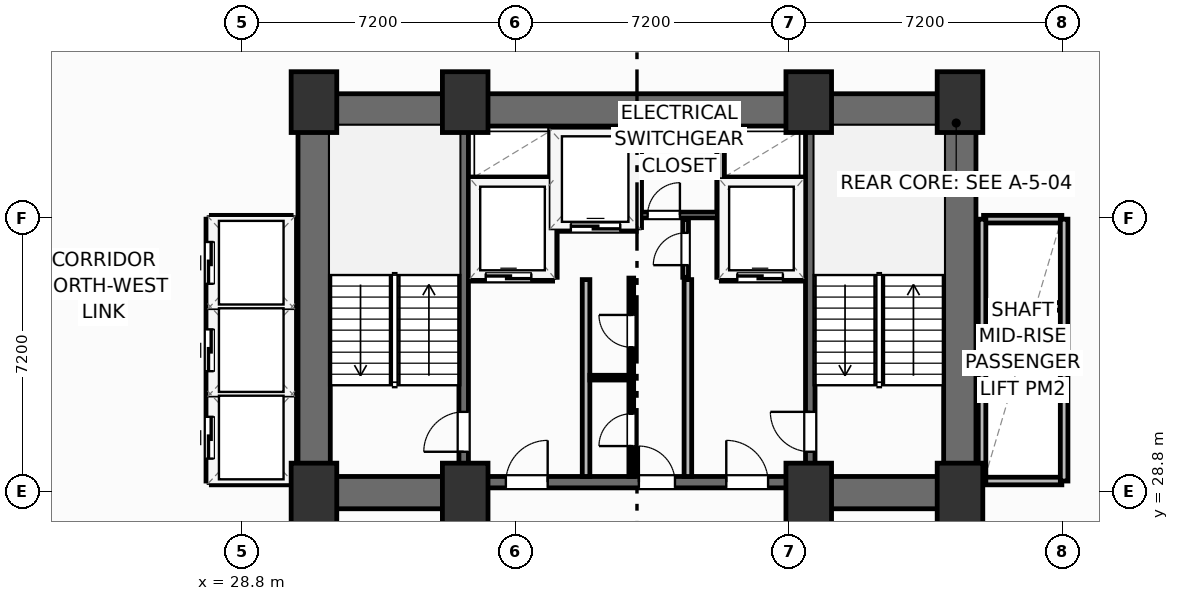
"""IFC4 building model, lengths in metres.
Left out: names, types, materials, properties, quantities, classifications, styles, units other than length and angle.
Written with IfcOpenShell. Run it as: python <this file> out.ifc"""

import sys

from ifc_helpers import new_model, si_unit, direction, frame, frame_2d, origin, origin_2d, place, context, subcontext, project, spatial, rectangle, extrude, element, fill, save


model = new_model("IFC4")
c1 = context("Model", 3, precision=1e-05, world=origin(), true_north=direction((0.0, 1.0)))
c2 = subcontext(c1, "Body", "Model", "MODEL_VIEW")
j1 = project(units=[si_unit("LENGTHUNIT", "METRE"), si_unit("PLANEANGLEUNIT", "RADIAN")], contexts=[c1])
p1 = place(None, origin())
s1 = spatial("IfcSite", under=j1, at=p1, CompositionType="ELEMENT")
p2 = place(p1, origin())
s2 = spatial("IfcBuilding", under=s1, at=p2, CompositionType="ELEMENT")
p3 = place(p2, frame((0.0, 0.0, 30.7)))
s3 = spatial("IfcBuildingStorey", under=s2, at=p3, CompositionType="ELEMENT", Elevation=30.7)
for number, where, z_axis, x_axis in (
    (1, (30.7, 28.75, 0.0), (0.0, 0.0, 1.0), (1.0, 0.0, 0.0)),
    (2, (34.68, 28.75, 0.0), (0.0, 0.0, 1.0), (1.0, 0.0, 0.0)),
    (3, (43.72, 28.75, 0.0), (0.0, 0.0, 1.0), (1.0, 0.0, 0.0)),
    (4, (47.7, 28.75, 0.0), (0.0, 0.0, 1.0), (1.0, 0.0, 0.0)),
    (5, (30.7, 39.05, 0.0), (0.0, 0.0, 1.0), (1.0, 0.0, 0.0)),
    (6, (34.68, 39.05, 0.0), (0.0, 0.0, 1.0), (1.0, 0.0, 0.0)),
    (7, (43.72, 39.05, 0.0), (0.0, 0.0, 1.0), (1.0, 0.0, 0.0)),
    (8, (47.7, 39.05, 0.0), (0.0, 0.0, 1.0), (1.0, 0.0, 0.0)),
):
    element("IfcColumn", number, at=place(p3, frame(where, z_axis=z_axis, x_axis=x_axis)), inside=s3, PredefinedType="COLUMN", context=c2, shape_type="SweptSolid", body=[
        extrude(rectangle(XDim=1.2, YDim=1.6, at=origin_2d()), origin(), (0.0, 0.0, 1.0), 3.7),
    ])
p4 = place(p3, frame((30.28, 38.845, 0.0), z_axis=(0.0, 0.0, 1.0), x_axis=(1.0, 0.0, 0.0)))
e9 = element("IfcWall", 9, at=p4, inside=s3, PredefinedType="SHEAR", context=c2, shape_type="SweptSolid", body=[
    extrude(rectangle(XDim=17.84, YDim=0.85, at=frame_2d((8.92, 0.0))), origin(), (0.0, 0.0, 1.0), 3.45),
])
for number, where, z_axis, x_axis in (
    (10, (30.705, 29.2, 0.0), (0.0, 0.0, 1.0), (0.0, 1.0, 0.0)),
    (11, (47.695, 29.2, 0.0), (0.0, 0.0, 1.0), (0.0, 1.0, 0.0)),
):
    element("IfcWall", number, at=place(p3, frame(where, z_axis=z_axis, x_axis=x_axis)), inside=s3, PredefinedType="SHEAR", context=c2, shape_type="SweptSolid", body=[
        extrude(rectangle(XDim=9.22, YDim=0.85, at=frame_2d((4.61, 0.0))), origin(), (0.0, 0.0, 1.0), 3.45),
    ])
for number, where, z_axis, x_axis in (
    (12, (30.28, 28.775, 0.0), (0.0, 0.0, 1.0), (1.0, 0.0, 0.0)),
    (13, (43.6, 28.775, 0.0), (0.0, 0.0, 1.0), (1.0, 0.0, 0.0)),
):
    element("IfcWall", number, at=place(p3, frame(where, z_axis=z_axis, x_axis=x_axis)), inside=s3, PredefinedType="SHEAR", context=c2, shape_type="SweptSolid", body=[
        extrude(rectangle(XDim=4.52, YDim=0.85, at=frame_2d((2.26, 0.0))), origin(), (0.0, 0.0, 1.0), 3.45),
    ])
p5 = place(p3, frame((34.8, 29.05, 0.0), z_axis=(0.0, 0.0, 1.0), x_axis=(1.0, 0.0, 0.0)))
e14 = element("IfcWall", 14, at=p5, inside=s3, PredefinedType="SHEAR", context=c2, shape_type="SweptSolid", body=[
    extrude(rectangle(XDim=8.8, YDim=0.3, at=frame_2d((4.4, 0.0))), origin(), (0.0, 0.0, 1.0), 3.45),
])
p6 = place(p5, frame((0.95, 0.0, 0.0)))
e15 = element("IfcOpeningElement", 15, at=p6, cuts=e14, PredefinedType="OPENING", context=c2, shape_type="SweptSolid", body=[
    extrude(rectangle(XDim=1.1, YDim=2.15, at=frame_2d((0.55, 1.075))), frame((0.0, 0.16, 0.0), z_axis=(0.0, -1.0, 0.0), x_axis=(1.0, 0.0, 0.0)), (0.0, 0.0, 1.0), 0.32),
])
p7 = place(p5, frame((6.75, 0.0, 0.0)))
e16 = element("IfcOpeningElement", 16, at=p7, cuts=e14, PredefinedType="OPENING", context=c2, shape_type="SweptSolid", body=[
    extrude(rectangle(XDim=1.1, YDim=2.15, at=frame_2d((0.55, 1.075))), frame((0.0, 0.16, 0.0), z_axis=(0.0, -1.0, 0.0), x_axis=(1.0, 0.0, 0.0)), (0.0, 0.0, 1.0), 0.32),
])
p8 = place(p5, frame((4.45, 0.0, 0.0)))
e17 = element("IfcOpeningElement", 17, at=p8, cuts=e14, PredefinedType="OPENING", context=c2, shape_type="SweptSolid", body=[
    extrude(rectangle(XDim=0.95, YDim=2.15, at=frame_2d((0.475, 1.075))), frame((0.0, 0.16, 0.0), z_axis=(0.0, -1.0, 0.0), x_axis=(1.0, 0.0, 0.0)), (0.0, 0.0, 1.0), 0.32),
])
p9 = place(p3, frame((34.64, 29.2, 0.0), z_axis=(0.0, 0.0, 1.0), x_axis=(0.0, 1.0, 0.0)))
e18 = element("IfcWall", 18, at=p9, inside=s3, PredefinedType="SHEAR", context=c2, shape_type="SweptSolid", body=[
    extrude(rectangle(XDim=9.22, YDim=0.25, at=frame_2d((4.61, 0.0))), origin(), (0.0, 0.0, 1.0), 3.45),
])
p10 = place(p9, frame((0.65, 0.0, 0.0)))
e19 = element("IfcOpeningElement", 19, at=p10, cuts=e18, PredefinedType="OPENING", context=c2, shape_type="SweptSolid", body=[
    extrude(rectangle(XDim=1.05, YDim=2.15, at=frame_2d((0.525, 1.075))), frame((0.0, 0.135, 0.0), z_axis=(0.0, -1.0, 0.0), x_axis=(1.0, 0.0, 0.0)), (0.0, 0.0, 1.0), 0.27),
])
p11 = place(p3, frame((43.76, 29.2, 0.0), z_axis=(0.0, 0.0, 1.0), x_axis=(0.0, 1.0, 0.0)))
e20 = element("IfcWall", 20, at=p11, inside=s3, PredefinedType="SHEAR", context=c2, shape_type="SweptSolid", body=[
    extrude(rectangle(XDim=9.22, YDim=0.25, at=frame_2d((4.61, 0.0))), origin(), (0.0, 0.0, 1.0), 3.45),
])
p12 = place(p11, frame((0.65, 0.0, 0.0)))
e21 = element("IfcOpeningElement", 21, at=p12, cuts=e20, PredefinedType="OPENING", context=c2, shape_type="SweptSolid", body=[
    extrude(rectangle(XDim=1.05, YDim=2.15, at=frame_2d((0.525, 1.075))), frame((0.0, 0.135, 0.0), z_axis=(0.0, -1.0, 0.0), x_axis=(1.0, 0.0, 0.0)), (0.0, 0.0, 1.0), 0.27),
])
for number, where, z_axis, x_axis in (
    (22, (37.86, 29.2, 0.0), (0.0, 0.0, 1.0), (0.0, 1.0, 0.0)),
    (23, (40.54, 29.2, 0.0), (0.0, 0.0, 1.0), (0.0, 1.0, 0.0)),
):
    element("IfcWall", number, at=place(p3, frame(where, z_axis=z_axis, x_axis=x_axis)), inside=s3, PredefinedType="PARTITIONING", context=c2, shape_type="SweptSolid", body=[
        extrude(rectangle(XDim=5.18, YDim=0.2, at=frame_2d((2.59, 0.0))), origin(), (0.0, 0.0, 1.0), 3.45),
    ])
p13 = place(p3, frame((34.8, 34.44, 0.0), z_axis=(0.0, 0.0, 1.0), x_axis=(1.0, 0.0, 0.0)))
e24 = element("IfcWall", 24, at=p13, inside=s3, PredefinedType="PARTITIONING", context=c2, shape_type="SweptSolid", body=[
    extrude(rectangle(XDim=2.18, YDim=0.2, at=frame_2d((1.09, 0.0))), origin(), (0.0, 0.0, 1.0), 3.45),
])
p14 = place(p13, frame((0.42, 0.0, 0.0)))
e25 = element("IfcOpeningElement", 25, at=p14, cuts=e24, PredefinedType="OPENING", context=c2, shape_type="SweptSolid", body=[
    extrude(rectangle(XDim=1.2, YDim=2.2, at=frame_2d((0.6, 1.1))), frame((0.0, 0.11, 0.0), z_axis=(0.0, -1.0, 0.0), x_axis=(1.0, 0.0, 0.0)), (0.0, 0.0, 1.0), 0.22),
])
p15 = place(p3, frame((34.8, 36.98, 0.0), z_axis=(0.0, 0.0, 1.0), x_axis=(1.0, 0.0, 0.0)))
e26 = element("IfcWall", 26, at=p15, inside=s3, PredefinedType="PARTITIONING", context=c2, shape_type="SweptSolid", body=[
    extrude(rectangle(XDim=2.18, YDim=0.2, at=frame_2d((1.09, 0.0))), origin(), (0.0, 0.0, 1.0), 3.45),
])
p16 = place(p3, frame((37.0, 34.44, 0.0), z_axis=(0.0, 0.0, 1.0), x_axis=(0.0, 1.0, 0.0)))
e27 = element("IfcWall", 27, at=p16, inside=s3, PredefinedType="PARTITIONING", context=c2, shape_type="SweptSolid", body=[
    extrude(rectangle(XDim=3.9, YDim=0.2, at=frame_2d((1.95, 0.0))), origin(), (0.0, 0.0, 1.0), 3.45),
])
p17 = place(p3, frame((41.42, 34.44, 0.0), z_axis=(0.0, 0.0, 1.0), x_axis=(1.0, 0.0, 0.0)))
e28 = element("IfcWall", 28, at=p17, inside=s3, PredefinedType="PARTITIONING", context=c2, shape_type="SweptSolid", body=[
    extrude(rectangle(XDim=2.18, YDim=0.2, at=frame_2d((1.09, 0.0))), origin(), (0.0, 0.0, 1.0), 3.45),
])
p18 = place(p17, frame((0.42, 0.0, 0.0)))
e29 = element("IfcOpeningElement", 29, at=p18, cuts=e28, PredefinedType="OPENING", context=c2, shape_type="SweptSolid", body=[
    extrude(rectangle(XDim=1.2, YDim=2.2, at=frame_2d((0.6, 1.1))), frame((0.0, 0.11, 0.0), z_axis=(0.0, -1.0, 0.0), x_axis=(1.0, 0.0, 0.0)), (0.0, 0.0, 1.0), 0.22),
])
p19 = place(p3, frame((41.42, 36.98, 0.0), z_axis=(0.0, 0.0, 1.0), x_axis=(1.0, 0.0, 0.0)))
e30 = element("IfcWall", 30, at=p19, inside=s3, PredefinedType="PARTITIONING", context=c2, shape_type="SweptSolid", body=[
    extrude(rectangle(XDim=2.18, YDim=0.2, at=frame_2d((1.09, 0.0))), origin(), (0.0, 0.0, 1.0), 3.45),
])
p20 = place(p3, frame((41.4, 34.44, 0.0), z_axis=(0.0, 0.0, 1.0), x_axis=(0.0, 1.0, 0.0)))
e31 = element("IfcWall", 31, at=p20, inside=s3, PredefinedType="PARTITIONING", context=c2, shape_type="SweptSolid", body=[
    extrude(rectangle(XDim=3.9, YDim=0.2, at=frame_2d((1.95, 0.0))), origin(), (0.0, 0.0, 1.0), 3.45),
])
p21 = place(p3, frame((37.06, 35.75, 0.0), z_axis=(0.0, 0.0, 1.0), x_axis=(1.0, 0.0, 0.0)))
e32 = element("IfcWall", 32, at=p21, inside=s3, PredefinedType="PARTITIONING", context=c2, shape_type="SweptSolid", body=[
    extrude(rectangle(XDim=2.12, YDim=0.2, at=frame_2d((1.06, 0.0))), origin(), (0.0, 0.0, 1.0), 3.45),
])
p22 = place(p21, frame((0.4, 0.0, 0.0)))
e33 = element("IfcOpeningElement", 33, at=p22, cuts=e32, PredefinedType="OPENING", context=c2, shape_type="SweptSolid", body=[
    extrude(rectangle(XDim=1.3, YDim=2.2, at=frame_2d((0.65, 1.1))), frame((0.0, 0.11, 0.0), z_axis=(0.0, -1.0, 0.0), x_axis=(1.0, 0.0, 0.0)), (0.0, 0.0, 1.0), 0.22),
])
p23 = place(p3, frame((39.22, 35.75, 0.0), z_axis=(0.0, 0.0, 1.0), x_axis=(0.0, 1.0, 0.0)))
e34 = element("IfcWall", 34, at=p23, inside=s3, PredefinedType="PARTITIONING", context=c2, shape_type="SweptSolid", body=[
    extrude(rectangle(XDim=2.59, YDim=0.2, at=frame_2d((1.295, 0.0))), origin(), (0.0, 0.0, 1.0), 3.45),
])
p24 = place(p3, frame((39.3, 36.08, 0.0), z_axis=(0.0, 0.0, 1.0), x_axis=(1.0, 0.0, 0.0)))
e35 = element("IfcWall", 35, at=p24, inside=s3, PredefinedType="PARTITIONING", context=c2, shape_type="SweptSolid", body=[
    extrude(rectangle(XDim=2.02, YDim=0.15, at=frame_2d((1.01, 0.0))), origin(), (0.0, 0.0, 1.0), 3.45),
])
p25 = place(p24, frame((0.18, 0.0, 0.0)))
e36 = element("IfcOpeningElement", 36, at=p25, cuts=e35, PredefinedType="OPENING", context=c2, shape_type="SweptSolid", body=[
    extrude(rectangle(XDim=0.85, YDim=2.05, at=frame_2d((0.425, 1.025))), frame((0.0, 0.085, 0.0), z_axis=(0.0, -1.0, 0.0), x_axis=(1.0, 0.0, 0.0)), (0.0, 0.0, 1.0), 0.17),
])
p26 = place(p3, frame((40.48, 34.44, 0.0), z_axis=(0.0, 0.0, 1.0), x_axis=(0.0, 1.0, 0.0)))
e37 = element("IfcWall", 37, at=p26, inside=s3, PredefinedType="PARTITIONING", context=c2, shape_type="SweptSolid", body=[
    extrude(rectangle(XDim=1.52, YDim=0.15, at=frame_2d((0.76, 0.0))), origin(), (0.0, 0.0, 1.0), 3.45),
])
p27 = place(p26, frame((0.32, 0.0, 0.0)))
e38 = element("IfcOpeningElement", 38, at=p27, cuts=e37, PredefinedType="OPENING", context=c2, shape_type="SweptSolid", body=[
    extrude(rectangle(XDim=0.85, YDim=2.05, at=frame_2d((0.425, 1.025))), frame((0.0, 0.085, 0.0), z_axis=(0.0, -1.0, 0.0), x_axis=(1.0, 0.0, 0.0)), (0.0, 0.0, 1.0), 0.17),
])
p28 = place(p3, frame((37.96, 31.8, 0.0), z_axis=(0.0, 0.0, 1.0), x_axis=(1.0, 0.0, 0.0)))
e39 = element("IfcWall", 39, at=p28, inside=s3, PredefinedType="PARTITIONING", context=c2, shape_type="SweptSolid", body=[
    extrude(rectangle(XDim=1.09, YDim=0.125, at=frame_2d((0.545, 0.0))), origin(), (0.0, 0.0, 1.0), 3.45),
])
p29 = place(p3, frame((39.05, 29.2, 0.0), z_axis=(0.0, 0.0, 1.0), x_axis=(0.0, 1.0, 0.0)))
e40 = element("IfcWall", 40, at=p29, inside=s3, PredefinedType="PARTITIONING", context=c2, shape_type="SweptSolid", body=[
    extrude(rectangle(XDim=5.22, YDim=0.125, at=frame_2d((2.61, 0.0))), origin(), (0.0, 0.0, 1.0), 3.45),
])
p30 = place(p29, frame((0.8, 0.0, 0.0)))
e41 = element("IfcOpeningElement", 41, at=p30, cuts=e40, PredefinedType="OPENING", context=c2, shape_type="SweptSolid", body=[
    extrude(rectangle(XDim=0.85, YDim=2.05, at=frame_2d((0.425, 1.025))), frame((0.0, 0.073, 0.0), z_axis=(0.0, -1.0, 0.0), x_axis=(1.0, 0.0, 0.0)), (0.0, 0.0, 1.0), 0.145),
])
p31 = place(p29, frame((3.4, 0.0, 0.0)))
e42 = element("IfcOpeningElement", 42, at=p31, cuts=e40, PredefinedType="OPENING", context=c2, shape_type="SweptSolid", body=[
    extrude(rectangle(XDim=0.85, YDim=2.05, at=frame_2d((0.425, 1.025))), frame((0.0, 0.073, 0.0), z_axis=(0.0, -1.0, 0.0), x_axis=(1.0, 0.0, 0.0)), (0.0, 0.0, 1.0), 0.145),
])
for number, where, z_axis, x_axis in (
    (43, (28.02, 31.375, 0.0), (0.0, 0.0, 1.0), (1.0, 0.0, 0.0)),
    (44, (28.02, 33.675, 0.0), (0.0, 0.0, 1.0), (1.0, 0.0, 0.0)),
):
    element("IfcWall", number, at=place(p3, frame(where, z_axis=z_axis, x_axis=x_axis)), inside=s3, PredefinedType="PARTITIONING", context=c2, shape_type="SweptSolid", body=[
        extrude(rectangle(XDim=2.06, YDim=0.2, at=frame_2d((1.03, 0.0))), origin(), (0.0, 0.0, 1.0), 3.45),
    ])
for number, where, z_axis, x_axis in (
    (45, (28.0, 29.08, 0.0), (0.0, 0.0, 1.0), (1.0, 0.0, 0.0)),
    (46, (28.0, 35.97, 0.0), (0.0, 0.0, 1.0), (1.0, 0.0, 0.0)),
):
    element("IfcWall", number, at=place(p3, frame(where, z_axis=z_axis, x_axis=x_axis)), inside=s3, PredefinedType="PARTITIONING", context=c2, shape_type="SweptSolid", body=[
        extrude(rectangle(XDim=2.1, YDim=0.2, at=frame_2d((1.05, 0.0))), origin(), (0.0, 0.0, 1.0), 3.45),
    ])
p32 = place(p3, frame((30.12, 29.08, 0.0), z_axis=(0.0, 0.0, 1.0), x_axis=(0.0, 1.0, 0.0)))
e47 = element("IfcWall", 47, at=p32, inside=s3, PredefinedType="PARTITIONING", context=c2, shape_type="SweptSolid", body=[
    extrude(rectangle(XDim=6.89, YDim=0.2, at=frame_2d((3.445, 0.0))), origin(), (0.0, 0.0, 1.0), 3.45),
])
p33 = place(p3, frame((27.96, 29.08, 0.0), z_axis=(0.0, 0.0, 1.0), x_axis=(0.0, 1.0, 0.0)))
e48 = element("IfcWall", 48, at=p33, inside=s3, PredefinedType="PARTITIONING", context=c2, shape_type="SweptSolid", body=[
    extrude(rectangle(XDim=6.89, YDim=0.2, at=frame_2d((3.445, 0.0))), origin(), (0.0, 0.0, 1.0), 3.45),
])
p34 = place(p33, frame((0.59, 0.0, 0.0)))
e49 = element("IfcOpeningElement", 49, at=p34, cuts=e48, PredefinedType="OPENING", context=c2, shape_type="SweptSolid", body=[
    extrude(rectangle(XDim=1.1, YDim=2.15, at=frame_2d((0.55, 1.075))), frame((0.0, 0.11, 0.0), z_axis=(0.0, -1.0, 0.0), x_axis=(1.0, 0.0, 0.0)), (0.0, 0.0, 1.0), 0.22),
])
p35 = place(p33, frame((2.89, 0.0, 0.0)))
e50 = element("IfcOpeningElement", 50, at=p35, cuts=e48, PredefinedType="OPENING", context=c2, shape_type="SweptSolid", body=[
    extrude(rectangle(XDim=1.1, YDim=2.15, at=frame_2d((0.55, 1.075))), frame((0.0, 0.11, 0.0), z_axis=(0.0, -1.0, 0.0), x_axis=(1.0, 0.0, 0.0)), (0.0, 0.0, 1.0), 0.22),
])
p36 = place(p33, frame((5.19, 0.0, 0.0)))
e51 = element("IfcOpeningElement", 51, at=p36, cuts=e48, PredefinedType="OPENING", context=c2, shape_type="SweptSolid", body=[
    extrude(rectangle(XDim=1.1, YDim=2.15, at=frame_2d((0.55, 1.075))), frame((0.0, 0.11, 0.0), z_axis=(0.0, -1.0, 0.0), x_axis=(1.0, 0.0, 0.0)), (0.0, 0.0, 1.0), 0.22),
])
for number, where, z_axis, x_axis in (
    (52, (48.32, 31.375, 0.0), (0.0, 0.0, 1.0), (1.0, 0.0, 0.0)),
    (53, (48.32, 33.675, 0.0), (0.0, 0.0, 1.0), (1.0, 0.0, 0.0)),
):
    element("IfcWall", number, at=place(p3, frame(where, z_axis=z_axis, x_axis=x_axis)), inside=s3, PredefinedType="PARTITIONING", context=c2, shape_type="SweptSolid", body=[
        extrude(rectangle(XDim=2.06, YDim=0.2, at=frame_2d((1.03, 0.0))), origin(), (0.0, 0.0, 1.0), 3.45),
    ])
p37 = place(p3, frame((48.32, 29.08, 0.0), z_axis=(0.0, 0.0, 1.0), x_axis=(1.0, 0.0, 0.0)))
e54 = element("IfcWall", 54, at=p37, inside=s3, PredefinedType="PARTITIONING", context=c2, shape_type="SweptSolid", body=[
    extrude(rectangle(XDim=2.06, YDim=0.2, at=frame_2d((1.03, 0.0))), origin(), (0.0, 0.0, 1.0), 2.662),
])
p38 = place(p3, frame((48.32, 35.97, 0.0), z_axis=(0.0, 0.0, 1.0), x_axis=(1.0, 0.0, 0.0)))
e55 = element("IfcWall", 55, at=p38, inside=s3, PredefinedType="PARTITIONING", context=c2, shape_type="SweptSolid", body=[
    extrude(rectangle(XDim=2.06, YDim=0.2, at=frame_2d((1.03, 0.0))), origin(), (0.0, 0.0, 1.0), 3.45),
])
for number, where, z_axis, x_axis in (
    (56, (48.28, 29.08, 0.0), (0.0, 0.0, 1.0), (0.0, 1.0, 0.0)),
    (57, (50.44, 29.08, 0.0), (0.0, 0.0, 1.0), (0.0, 1.0, 0.0)),
):
    element("IfcWall", number, at=place(p3, frame(where, z_axis=z_axis, x_axis=x_axis)), inside=s3, PredefinedType="PARTITIONING", context=c2, shape_type="SweptSolid", body=[
        extrude(rectangle(XDim=6.89, YDim=0.2, at=frame_2d((3.445, 0.0))), origin(), (0.0, 0.0, 1.0), 3.45),
    ])
p39 = place(p10, origin())
e58 = element("IfcDoor", 58, at=p39, inside=s3, OperationType="SINGLE_SWING_LEFT", PredefinedType="DOOR", context=c2, shape_type="SweptSolid", body=[
    extrude(rectangle(XDim=1.05, YDim=2.15, at=frame_2d((0.525, 1.075))), frame((0.0, 0.025, 0.0), z_axis=(0.0, -1.0, 0.0), x_axis=(1.0, 0.0, 0.0)), (0.0, 0.0, 1.0), 0.05),
])
fill(e19, e58)
p40 = place(p12, origin())
e59 = element("IfcDoor", 59, at=p40, inside=s3, OperationType="SINGLE_SWING_RIGHT", PredefinedType="DOOR", context=c2, shape_type="SweptSolid", body=[
    extrude(rectangle(XDim=1.05, YDim=2.15, at=frame_2d((0.525, 1.075))), frame((0.0, 0.025, 0.0), z_axis=(0.0, -1.0, 0.0), x_axis=(1.0, 0.0, 0.0)), (0.0, 0.0, 1.0), 0.05),
])
fill(e21, e59)
p41 = place(p6, origin())
e60 = element("IfcDoor", 60, at=p41, inside=s3, OperationType="SINGLE_SWING_RIGHT", PredefinedType="DOOR", context=c2, shape_type="SweptSolid", body=[
    extrude(rectangle(XDim=1.1, YDim=2.15, at=frame_2d((0.55, 1.075))), frame((0.0, 0.025, 0.0), z_axis=(0.0, -1.0, 0.0), x_axis=(1.0, 0.0, 0.0)), (0.0, 0.0, 1.0), 0.05),
])
fill(e15, e60)
p42 = place(p7, origin())
e61 = element("IfcDoor", 61, at=p42, inside=s3, OperationType="SINGLE_SWING_LEFT", PredefinedType="DOOR", context=c2, shape_type="SweptSolid", body=[
    extrude(rectangle(XDim=1.1, YDim=2.15, at=frame_2d((0.55, 1.075))), frame((0.0, 0.025, 0.0), z_axis=(0.0, -1.0, 0.0), x_axis=(1.0, 0.0, 0.0)), (0.0, 0.0, 1.0), 0.05),
])
fill(e16, e61)
p43 = place(p14, origin())
e62 = element("IfcDoor", 62, at=p43, inside=s3, OperationType="SLIDING_TO_LEFT", PredefinedType="DOOR", context=c2, shape_type="SweptSolid", body=[
    extrude(rectangle(XDim=1.2, YDim=2.2, at=frame_2d((0.6, 1.1))), frame((0.0, 0.025, 0.0), z_axis=(0.0, -1.0, 0.0), x_axis=(1.0, 0.0, 0.0)), (0.0, 0.0, 1.0), 0.05),
])
fill(e25, e62)
p44 = place(p18, origin())
e63 = element("IfcDoor", 63, at=p44, inside=s3, OperationType="SLIDING_TO_LEFT", PredefinedType="DOOR", context=c2, shape_type="SweptSolid", body=[
    extrude(rectangle(XDim=1.2, YDim=2.2, at=frame_2d((0.6, 1.1))), frame((0.0, 0.025, 0.0), z_axis=(0.0, -1.0, 0.0), x_axis=(1.0, 0.0, 0.0)), (0.0, 0.0, 1.0), 0.05),
])
fill(e29, e63)
p45 = place(p22, origin())
e64 = element("IfcDoor", 64, at=p45, inside=s3, OperationType="SLIDING_TO_LEFT", PredefinedType="DOOR", context=c2, shape_type="SweptSolid", body=[
    extrude(rectangle(XDim=1.3, YDim=2.2, at=frame_2d((0.65, 1.1))), frame((0.0, 0.025, 0.0), z_axis=(0.0, -1.0, 0.0), x_axis=(1.0, 0.0, 0.0)), (0.0, 0.0, 1.0), 0.05),
])
fill(e33, e64)
p46 = place(p25, origin())
e65 = element("IfcDoor", 65, at=p46, inside=s3, OperationType="SINGLE_SWING_RIGHT", PredefinedType="DOOR", context=c2, shape_type="SweptSolid", body=[
    extrude(rectangle(XDim=0.85, YDim=2.05, at=frame_2d((0.425, 1.025))), frame((0.0, 0.025, 0.0), z_axis=(0.0, -1.0, 0.0), x_axis=(1.0, 0.0, 0.0)), (0.0, 0.0, 1.0), 0.05),
])
fill(e36, e65)
p47 = place(p27, origin())
e66 = element("IfcDoor", 66, at=p47, inside=s3, OperationType="SINGLE_SWING_LEFT", PredefinedType="DOOR", context=c2, shape_type="SweptSolid", body=[
    extrude(rectangle(XDim=0.85, YDim=2.05, at=frame_2d((0.425, 1.025))), frame((0.0, 0.025, 0.0), z_axis=(0.0, -1.0, 0.0), x_axis=(1.0, 0.0, 0.0)), (0.0, 0.0, 1.0), 0.05),
])
fill(e38, e66)
p48 = place(p30, origin())
e67 = element("IfcDoor", 67, at=p48, inside=s3, OperationType="SINGLE_SWING_LEFT", PredefinedType="DOOR", context=c2, shape_type="SweptSolid", body=[
    extrude(rectangle(XDim=0.85, YDim=2.05, at=frame_2d((0.425, 1.025))), frame((0.0, 0.025, 0.0), z_axis=(0.0, -1.0, 0.0), x_axis=(1.0, 0.0, 0.0)), (0.0, 0.0, 1.0), 0.05),
])
fill(e41, e67)
p49 = place(p31, origin())
e68 = element("IfcDoor", 68, at=p49, inside=s3, OperationType="SINGLE_SWING_RIGHT", PredefinedType="DOOR", context=c2, shape_type="SweptSolid", body=[
    extrude(rectangle(XDim=0.85, YDim=2.05, at=frame_2d((0.425, 1.025))), frame((0.0, 0.025, 0.0), z_axis=(0.0, -1.0, 0.0), x_axis=(1.0, 0.0, 0.0)), (0.0, 0.0, 1.0), 0.05),
])
fill(e42, e68)
p50 = place(p8, origin())
e69 = element("IfcDoor", 69, at=p50, inside=s3, OperationType="SINGLE_SWING_LEFT", PredefinedType="DOOR", context=c2, shape_type="SweptSolid", body=[
    extrude(rectangle(XDim=0.95, YDim=2.15, at=frame_2d((0.475, 1.075))), frame((0.0, 0.025, 0.0), z_axis=(0.0, -1.0, 0.0), x_axis=(1.0, 0.0, 0.0)), (0.0, 0.0, 1.0), 0.05),
])
fill(e17, e69)
p51 = place(p34, origin())
e70 = element("IfcDoor", 70, at=p51, inside=s3, OperationType="SLIDING_TO_LEFT", PredefinedType="DOOR", context=c2, shape_type="SweptSolid", body=[
    extrude(rectangle(XDim=1.1, YDim=2.15, at=frame_2d((0.55, 1.075))), frame((0.0, 0.025, 0.0), z_axis=(0.0, -1.0, 0.0), x_axis=(1.0, 0.0, 0.0)), (0.0, 0.0, 1.0), 0.05),
])
fill(e49, e70)
p52 = place(p35, origin())
e71 = element("IfcDoor", 71, at=p52, inside=s3, OperationType="SLIDING_TO_LEFT", PredefinedType="DOOR", context=c2, shape_type="SweptSolid", body=[
    extrude(rectangle(XDim=1.1, YDim=2.15, at=frame_2d((0.55, 1.075))), frame((0.0, 0.025, 0.0), z_axis=(0.0, -1.0, 0.0), x_axis=(1.0, 0.0, 0.0)), (0.0, 0.0, 1.0), 0.05),
])
fill(e50, e71)
p53 = place(p36, origin())
e72 = element("IfcDoor", 72, at=p53, inside=s3, OperationType="SLIDING_TO_LEFT", PredefinedType="DOOR", context=c2, shape_type="SweptSolid", body=[
    extrude(rectangle(XDim=1.1, YDim=2.15, at=frame_2d((0.55, 1.075))), frame((0.0, 0.025, 0.0), z_axis=(0.0, -1.0, 0.0), x_axis=(1.0, 0.0, 0.0)), (0.0, 0.0, 1.0), 0.05),
])
fill(e51, e72)
save(model, sys.argv[1])
